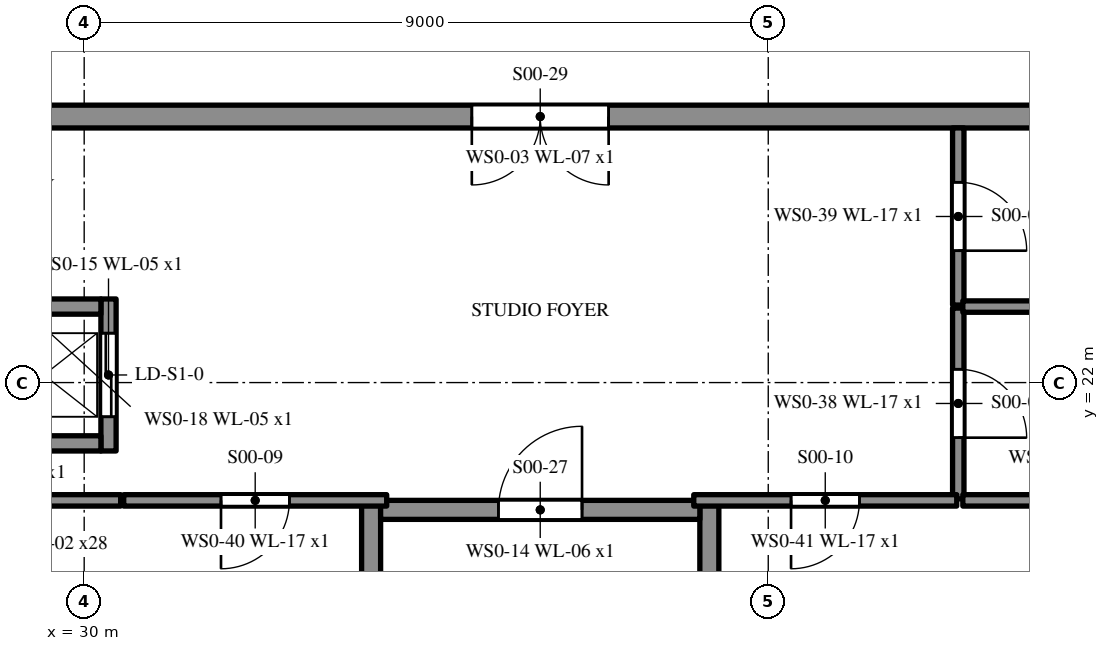
"""IFC4 building model, lengths in metres.
Left out: names, types, materials, properties, quantities, classifications, styles, units other than length and angle.
Written with IfcOpenShell. Run it as: python <this file> out.ifc"""

import sys

from ifc_helpers import new_model, si_unit, direction, frame, frame_2d, origin, place, context, subcontext, project, spatial, rectangle, extrude, element, fill, save


model = new_model("IFC4")
c1 = context("Model", 3, precision=1e-05, world=origin(), true_north=direction((0.0, 1.0)))
c2 = subcontext(c1, "Body", "Model", "MODEL_VIEW")
j1 = project(units=[si_unit("LENGTHUNIT", "METRE"), si_unit("PLANEANGLEUNIT", "RADIAN")], contexts=[c1])
p1 = place(None, origin())
s1 = spatial("IfcSite", under=j1, at=p1, CompositionType="ELEMENT")
p2 = place(p1, origin())
s2 = spatial("IfcBuilding", under=s1, at=p2, CompositionType="ELEMENT")
p3 = place(p2, origin())
s3 = spatial("IfcBuildingStorey", under=s2, at=p3, CompositionType="ELEMENT", Elevation=0.0)
p4 = place(p3, frame((43.35, 25.5, 0.0), z_axis=(0.0, 0.0, 1.0), x_axis=(-1.0, 0.0, 0.0)))
e1 = element("IfcWall", 1, at=p4, inside=s3, PredefinedType="SHEAR", context=c2, shape_type="SweptSolid", body=[
    extrude(rectangle(XDim=14.7, YDim=0.3, at=frame_2d((7.35, 0.0))), origin(), (0.0, 0.0, 1.0), 5.1),
])
p5 = place(p4, frame((6.45, 0.0, 0.0)))
e2 = element("IfcOpeningElement", 2, at=p5, cuts=e1, PredefinedType="OPENING", context=c2, shape_type="SweptSolid", body=[
    extrude(rectangle(XDim=1.8, YDim=2.1, at=frame_2d((0.9, 1.05))), frame((0.0, 0.16, 0.0), z_axis=(0.0, -1.0, 0.0), x_axis=(1.0, 0.0, 0.0)), (0.0, 0.0, 1.0), 0.32),
])
for number, where, z_axis, x_axis in (
    (3, (33.775, 20.45, 0.0), (0.0, 0.0, 1.0), (0.0, -1.0, 0.0)),
    (4, (38.225, 11.9, 0.0), (0.0, 0.0, 1.0), (0.0, 1.0, 0.0)),
):
    element("IfcWall", number, at=place(p3, frame(where, z_axis=z_axis, x_axis=x_axis)), inside=s3, PredefinedType="SHEAR", context=c2, shape_type="SweptSolid", body=[
        extrude(rectangle(XDim=8.55, YDim=0.25, at=frame_2d((4.275, 0.0))), origin(), (0.0, 0.0, 1.0), 5.4),
    ])
p6 = place(p3, frame((33.9, 20.325, 0.0), z_axis=(0.0, 0.0, 1.0), x_axis=(1.0, 0.0, 0.0)))
e5 = element("IfcWall", 5, at=p6, inside=s3, PredefinedType="SHEAR", context=c2, shape_type="SweptSolid", body=[
    extrude(rectangle(XDim=4.2, YDim=0.25, at=frame_2d((2.1, 0.0))), origin(), (0.0, 0.0, 1.0), 5.4),
])
p7 = place(p6, frame((1.55, 0.0, 0.0)))
e6 = element("IfcOpeningElement", 6, at=p7, cuts=e5, PredefinedType="OPENING", context=c2, shape_type="SweptSolid", body=[
    extrude(rectangle(XDim=1.1, YDim=2.1, at=frame_2d((0.55, 1.05))), frame((0.0, 0.135, 0.0), z_axis=(0.0, -1.0, 0.0), x_axis=(1.0, 0.0, 0.0)), (0.0, 0.0, 1.0), 0.27),
])
p8 = place(p3, frame((30.32, 21.1, -1.2), z_axis=(0.0, 0.0, 1.0), x_axis=(0.0, 1.0, 0.0)))
e7 = element("IfcWall", 7, at=p8, inside=s3, PredefinedType="SHEAR", context=c2, shape_type="SweptSolid", body=[
    extrude(rectangle(XDim=2.0, YDim=0.2, at=frame_2d((1.0, 0.0))), origin(), (0.0, 0.0, 1.0), 6.3),
])
p9 = place(p8, frame((0.45, 0.0, 1.2)))
e8 = element("IfcOpeningElement", 8, at=p9, cuts=e7, PredefinedType="OPENING", context=c2, shape_type="SweptSolid", body=[
    extrude(rectangle(XDim=1.1, YDim=2.2, at=frame_2d((0.55, 1.1))), frame((0.0, 0.11, 0.0), z_axis=(0.0, -1.0, 0.0), x_axis=(1.0, 0.0, 0.0)), (0.0, 0.0, 1.0), 0.22),
])
for number, where, z_axis, x_axis in (
    (9, (28.12, 21.2, -1.2), (0.0, 0.0, 1.0), (1.0, 0.0, 0.0)),
    (10, (30.22, 23.0, -1.2), (0.0, 0.0, 1.0), (-1.0, 0.0, 0.0)),
):
    element("IfcWall", number, at=place(p3, frame(where, z_axis=z_axis, x_axis=x_axis)), inside=s3, PredefinedType="SHEAR", context=c2, shape_type="SweptSolid", body=[
        extrude(rectangle(XDim=2.1, YDim=0.2, at=frame_2d((1.05, 0.0))), origin(), (0.0, 0.0, 1.0), 6.3),
    ])
p10 = place(p3, frame((41.5, 22.98, 0.0), z_axis=(0.0, 0.0, 1.0), x_axis=(0.0, -1.0, 0.0)))
e11 = element("IfcWall", 11, at=p10, inside=s3, PredefinedType="PARTITIONING", context=c2, shape_type="SweptSolid", body=[
    extrude(rectangle(XDim=2.51, YDim=0.15, at=frame_2d((1.255, 0.0))), origin(), (0.0, 0.0, 1.0), 5.1),
])
p11 = place(p10, frame((0.805, 0.0, 0.0)))
e12 = element("IfcOpeningElement", 12, at=p11, cuts=e11, PredefinedType="OPENING", context=c2, shape_type="SweptSolid", body=[
    extrude(rectangle(XDim=0.9, YDim=2.1, at=frame_2d((0.45, 1.05))), frame((0.0, 0.085, 0.0), z_axis=(0.0, -1.0, 0.0), x_axis=(1.0, 0.0, 0.0)), (0.0, 0.0, 1.0), 0.17),
])
p12 = place(p3, frame((41.5, 25.351, 0.0), z_axis=(0.0, 0.0, 1.0), x_axis=(0.0, -1.0, 0.0)))
e13 = element("IfcWall", 13, at=p12, inside=s3, PredefinedType="PARTITIONING", context=c2, shape_type="SweptSolid", body=[
    extrude(rectangle(XDim=2.331, YDim=0.15, at=frame_2d((1.165, 0.0))), origin(), (0.0, 0.0, 1.0), 5.1),
])
p13 = place(p12, frame((0.715, 0.0, 0.0)))
e14 = element("IfcOpeningElement", 14, at=p13, cuts=e13, PredefinedType="OPENING", context=c2, shape_type="SweptSolid", body=[
    extrude(rectangle(XDim=0.9, YDim=2.1, at=frame_2d((0.45, 1.05))), frame((0.0, 0.085, 0.0), z_axis=(0.0, -1.0, 0.0), x_axis=(1.0, 0.0, 0.0)), (0.0, 0.0, 1.0), 0.17),
])
p14 = place(p3, frame((33.98, 20.45, 0.0), z_axis=(0.0, 0.0, 1.0), x_axis=(-1.0, 0.0, 0.0)))
e15 = element("IfcWall", 15, at=p14, inside=s3, PredefinedType="PARTITIONING", context=c2, shape_type="SweptSolid", body=[
    extrude(rectangle(XDim=3.46, YDim=0.15, at=frame_2d((1.73, 0.0))), origin(), (0.0, 0.0, 1.0), 5.1),
])
p15 = place(p14, frame((1.28, 0.0, 0.0)))
e16 = element("IfcOpeningElement", 16, at=p15, cuts=e15, PredefinedType="OPENING", context=c2, shape_type="SweptSolid", body=[
    extrude(rectangle(XDim=0.9, YDim=2.1, at=frame_2d((0.45, 1.05))), frame((0.0, 0.085, 0.0), z_axis=(0.0, -1.0, 0.0), x_axis=(1.0, 0.0, 0.0)), (0.0, 0.0, 1.0), 0.17),
])
p16 = place(p3, frame((41.48, 20.45, 0.0), z_axis=(0.0, 0.0, 1.0), x_axis=(-1.0, 0.0, 0.0)))
e17 = element("IfcWall", 17, at=p16, inside=s3, PredefinedType="PARTITIONING", context=c2, shape_type="SweptSolid", body=[
    extrude(rectangle(XDim=3.46, YDim=0.15, at=frame_2d((1.73, 0.0))), origin(), (0.0, 0.0, 1.0), 5.1),
])
p17 = place(p16, frame((1.28, 0.0, 0.0)))
e18 = element("IfcOpeningElement", 18, at=p17, cuts=e17, PredefinedType="OPENING", context=c2, shape_type="SweptSolid", body=[
    extrude(rectangle(XDim=0.9, YDim=2.1, at=frame_2d((0.45, 1.05))), frame((0.0, 0.085, 0.0), z_axis=(0.0, -1.0, 0.0), x_axis=(1.0, 0.0, 0.0)), (0.0, 0.0, 1.0), 0.17),
])
p18 = place(p3, frame((30.48, 20.45, 0.0), z_axis=(0.0, 0.0, 1.0), x_axis=(-1.0, 0.0, 0.0)))
e19 = element("IfcWall", 19, at=p18, inside=s3, PredefinedType="PARTITIONING", context=c2, shape_type="SweptSolid", body=[
    extrude(rectangle(XDim=3.196, YDim=0.15, at=frame_2d((1.598, 0.0))), origin(), (0.0, 0.0, 1.0), 5.1),
])
p19 = place(p3, frame((41.56, 23.0, 0.0), z_axis=(0.0, 0.0, 1.0), x_axis=(1.0, 0.0, 0.0)))
e20 = element("IfcWall", 20, at=p19, inside=s3, PredefinedType="PARTITIONING", context=c2, shape_type="SweptSolid", body=[
    extrude(rectangle(XDim=4.555, YDim=0.15, at=frame_2d((2.278, 0.0))), origin(), (0.0, 0.0, 1.0), 5.1),
])
p20 = place(p3, frame((44.716, 20.45, 0.0), z_axis=(0.0, 0.0, 1.0), x_axis=(-1.0, 0.0, 0.0)))
e21 = element("IfcWall", 21, at=p20, inside=s3, PredefinedType="PARTITIONING", context=c2, shape_type="SweptSolid", body=[
    extrude(rectangle(XDim=3.156, YDim=0.15, at=frame_2d((1.578, 0.0))), origin(), (0.0, 0.0, 1.0), 5.1),
])
p21 = place(p9, origin())
e22 = element("IfcDoor", 22, at=p21, inside=s3, OperationType="SLIDING_TO_LEFT", PredefinedType="DOOR", context=c2, shape_type="SweptSolid", body=[
    extrude(rectangle(XDim=1.1, YDim=2.2, at=frame_2d((0.55, 1.1))), frame((0.0, 0.025, 0.0), z_axis=(0.0, -1.0, 0.0), x_axis=(1.0, 0.0, 0.0)), (0.0, 0.0, 1.0), 0.05),
])
fill(e8, e22)
p22 = place(p11, origin())
e23 = element("IfcDoor", 23, at=p22, inside=s3, OperationType="SINGLE_SWING_RIGHT", PredefinedType="DOOR", context=c2, shape_type="SweptSolid", body=[
    extrude(rectangle(XDim=0.9, YDim=2.1, at=frame_2d((0.45, 1.05))), frame((0.0, 0.025, 0.0), z_axis=(0.0, -1.0, 0.0), x_axis=(1.0, 0.0, 0.0)), (0.0, 0.0, 1.0), 0.05),
])
fill(e12, e23)
p23 = place(p13, origin())
e24 = element("IfcDoor", 24, at=p23, inside=s3, OperationType="SINGLE_SWING_RIGHT", PredefinedType="DOOR", context=c2, shape_type="SweptSolid", body=[
    extrude(rectangle(XDim=0.9, YDim=2.1, at=frame_2d((0.45, 1.05))), frame((0.0, 0.025, 0.0), z_axis=(0.0, -1.0, 0.0), x_axis=(1.0, 0.0, 0.0)), (0.0, 0.0, 1.0), 0.05),
])
fill(e14, e24)
p24 = place(p15, origin())
e25 = element("IfcDoor", 25, at=p24, inside=s3, OperationType="SINGLE_SWING_RIGHT", PredefinedType="DOOR", context=c2, shape_type="SweptSolid", body=[
    extrude(rectangle(XDim=0.9, YDim=2.1, at=frame_2d((0.45, 1.05))), frame((0.0, 0.025, 0.0), z_axis=(0.0, -1.0, 0.0), x_axis=(1.0, 0.0, 0.0)), (0.0, 0.0, 1.0), 0.05),
])
fill(e16, e25)
p25 = place(p17, origin())
e26 = element("IfcDoor", 26, at=p25, inside=s3, OperationType="SINGLE_SWING_RIGHT", PredefinedType="DOOR", context=c2, shape_type="SweptSolid", body=[
    extrude(rectangle(XDim=0.9, YDim=2.1, at=frame_2d((0.45, 1.05))), frame((0.0, 0.025, 0.0), z_axis=(0.0, -1.0, 0.0), x_axis=(1.0, 0.0, 0.0)), (0.0, 0.0, 1.0), 0.05),
])
fill(e18, e26)
p26 = place(p7, origin())
e27 = element("IfcDoor", 27, at=p26, inside=s3, OperationType="SINGLE_SWING_RIGHT", PredefinedType="DOOR", context=c2, shape_type="SweptSolid", body=[
    extrude(rectangle(XDim=1.1, YDim=2.1, at=frame_2d((0.55, 1.05))), frame((0.0, 0.025, 0.0), z_axis=(0.0, -1.0, 0.0), x_axis=(1.0, 0.0, 0.0)), (0.0, 0.0, 1.0), 0.05),
])
fill(e6, e27)
p27 = place(p5, origin())
e28 = element("IfcDoor", 28, at=p27, inside=s3, OperationType="DOUBLE_DOOR_SINGLE_SWING", PredefinedType="DOOR", context=c2, shape_type="SweptSolid", body=[
    extrude(rectangle(XDim=1.8, YDim=2.1, at=frame_2d((0.9, 1.05))), frame((0.0, 0.025, 0.0), z_axis=(0.0, -1.0, 0.0), x_axis=(1.0, 0.0, 0.0)), (0.0, 0.0, 1.0), 0.05),
])
fill(e2, e28)
save(model, sys.argv[1])
